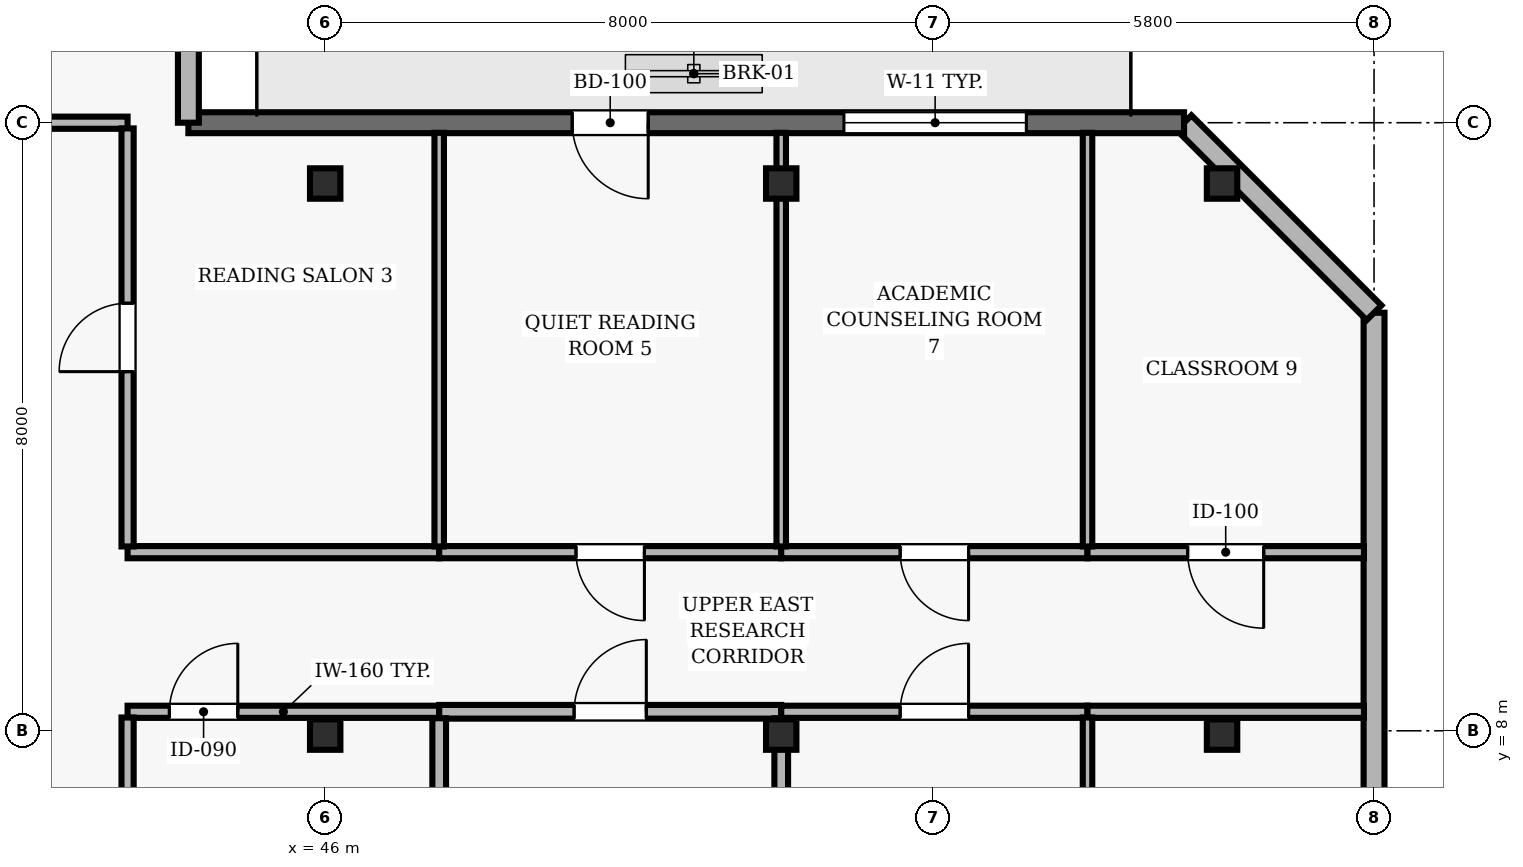
"""IFC4 building model, lengths in metres.
Left out: names, types, materials, properties, quantities, classifications, styles, units other than length and angle.
Written with IfcOpenShell. Run it as: python <this file> out.ifc"""

import sys

from ifc_helpers import new_model, si_unit, direction, frame, frame_2d, origin, origin_2d, place, context, subcontext, project, spatial, rectangle, hollow_rectangle, extrude, element, fill, save


model = new_model("IFC4")
c1 = context("Model", 3, precision=1e-05, world=origin(), true_north=direction((0.0, 1.0)))
c2 = subcontext(c1, "Body", "Model", "MODEL_VIEW")
j1 = project(units=[si_unit("LENGTHUNIT", "METRE"), si_unit("PLANEANGLEUNIT", "RADIAN")], contexts=[c1])
p1 = place(None, origin())
s1 = spatial("IfcSite", under=j1, at=p1, CompositionType="ELEMENT")
p2 = place(p1, origin())
s2 = spatial("IfcBuilding", under=s1, at=p2, CompositionType="ELEMENT")
p3 = place(p2, frame((0.0, 0.0, 271.6)))
s3 = spatial("IfcBuildingStorey", under=s2, at=p3, CompositionType="ELEMENT", Elevation=271.6)
for number, where, z_axis, x_axis in (
    (1, (46.0, 7.95, 0.0), (0.0, 0.0, 1.0), (1.0, 0.0, 0.0)),
    (2, (46.0, 15.2, 0.0), (0.0, 0.0, 1.0), (1.0, 0.0, 0.0)),
    (3, (52.0, 7.95, 0.0), (0.0, 0.0, 1.0), (1.0, 0.0, 0.0)),
    (4, (52.0, 15.2, 0.0), (0.0, 0.0, 1.0), (1.0, 0.0, 0.0)),
    (5, (57.8, 7.95, 0.0), (0.0, 0.0, 1.0), (1.0, 0.0, 0.0)),
    (6, (57.8, 15.2, 0.0), (0.0, 0.0, 1.0), (1.0, 0.0, 0.0)),
):
    element("IfcColumn", number, at=place(p3, frame(where, z_axis=z_axis, x_axis=x_axis)), inside=s3, PredefinedType="COLUMN", context=c2, shape_type="SweptSolid", body=[
        extrude(hollow_rectangle(XDim=0.4, YDim=0.4, WallThickness=0.02, at=origin_2d()), origin(), (0.0, 0.0, 1.0), 3.9),
    ])
p4 = place(p3, frame((59.8, 2.5, 0.0), z_axis=(0.0, 0.0, 1.0), x_axis=(0.0, 1.0, 0.0)))
e7 = element("IfcWall", 7, at=p4, inside=s3, PredefinedType="SOLIDWALL", context=c2, shape_type="SweptSolid", body=[
    extrude(rectangle(XDim=11.0, YDim=0.275, at=frame_2d((5.5, 0.0))), origin(), (0.0, 0.0, 1.0), 3.69),
])
p5 = place(p4, frame((1.35, 0.0, 0.9)))
e8 = element("IfcOpeningElement", 8, at=p5, cuts=e7, PredefinedType="OPENING", context=c2, shape_type="SweptSolid", body=[
    extrude(rectangle(XDim=2.8, YDim=1.8, at=frame_2d((1.4, 0.9))), frame((0.0, 0.147, 0.0), z_axis=(0.0, -1.0, 0.0), x_axis=(1.0, 0.0, 0.0)), (0.0, 0.0, 1.0), 0.295),
])
p6 = place(p3, frame((59.8, 13.5, 0.0), z_axis=(0.0, 0.0, 1.0), x_axis=(-0.707106781187, 0.707106781187, 0.0)))
e9 = element("IfcWall", 9, at=p6, inside=s3, PredefinedType="SOLIDWALL", context=c2, shape_type="SweptSolid", body=[
    extrude(rectangle(XDim=3.536, YDim=0.275, at=frame_2d((1.768, 0.0))), origin(), (0.0, 0.0, 1.0), 3.69),
])
p7 = place(p3, frame((57.3, 16.0, 0.0), z_axis=(0.0, 0.0, 1.0), x_axis=(-1.0, 0.0, 0.0)))
e10 = element("IfcWall", 10, at=p7, inside=s3, PredefinedType="SOLIDWALL", context=c2, shape_type="SweptSolid", body=[
    extrude(rectangle(XDim=13.1, YDim=0.275, at=frame_2d((6.55, 0.0))), origin(), (0.0, 0.0, 1.0), 3.69),
])
p8 = place(p7, frame((7.05, 0.0, 0.0)))
e11 = element("IfcOpeningElement", 11, at=p8, cuts=e10, PredefinedType="OPENING", context=c2, shape_type="SweptSolid", body=[
    extrude(rectangle(XDim=1.0, YDim=2.2, at=frame_2d((0.5, 1.1))), frame((0.0, 0.147, 0.0), z_axis=(0.0, -1.0, 0.0), x_axis=(1.0, 0.0, 0.0)), (0.0, 0.0, 1.0), 0.295),
])
p9 = place(p7, frame((2.075, 0.0, 0.9)))
e12 = element("IfcOpeningElement", 12, at=p9, cuts=e10, PredefinedType="OPENING", context=c2, shape_type="SweptSolid", body=[
    extrude(rectangle(XDim=2.4, YDim=2.2, at=frame_2d((1.2, 1.1))), frame((0.0, 0.147, 0.0), z_axis=(0.0, -1.0, 0.0), x_axis=(1.0, 0.0, 0.0)), (0.0, 0.0, 1.0), 0.295),
])
p10 = place(p3, frame((44.2, 16.0, 0.0), z_axis=(0.0, 0.0, 1.0), x_axis=(0.0, 1.0, 0.0)))
e13 = element("IfcWall", 13, at=p10, inside=s3, PredefinedType="SOLIDWALL", context=c2, shape_type="SweptSolid", body=[
    extrude(rectangle(XDim=5.4, YDim=0.275, at=frame_2d((2.7, 0.0))), origin(), (0.0, 0.0, 1.0), 3.69),
])
p11 = place(p10, frame((1.2, 0.0, 0.9)))
e14 = element("IfcOpeningElement", 14, at=p11, cuts=e13, PredefinedType="OPENING", context=c2, shape_type="SweptSolid", body=[
    extrude(rectangle(XDim=3.0, YDim=2.2, at=frame_2d((1.5, 1.1))), frame((0.0, 0.147, 0.0), z_axis=(0.0, -1.0, 0.0), x_axis=(1.0, 0.0, 0.0)), (0.0, 0.0, 1.0), 0.295),
])
p12 = place(p3, frame((43.4, 8.25, 0.0), z_axis=(0.0, 0.0, 1.0), x_axis=(1.0, 0.0, 0.0)))
e15 = element("IfcWall", 15, at=p12, inside=s3, PredefinedType="PARTITIONING", context=c2, shape_type="SweptSolid", body=[
    extrude(rectangle(XDim=4.1, YDim=0.16, at=frame_2d((2.05, 0.0))), origin(), (0.0, 0.0, 1.0), 3.221),
])
p13 = place(p12, frame((0.55, 0.0, 0.0)))
e16 = element("IfcOpeningElement", 16, at=p13, cuts=e15, PredefinedType="OPENING", context=c2, shape_type="SweptSolid", body=[
    extrude(rectangle(XDim=0.9, YDim=2.1, at=frame_2d((0.45, 1.05))), frame((0.0, 0.09, 0.0), z_axis=(0.0, -1.0, 0.0), x_axis=(1.0, 0.0, 0.0)), (0.0, 0.0, 1.0), 0.18),
])
p14 = place(p3, frame((43.4, 16.0, 0.0), z_axis=(0.0, 0.0, 1.0), x_axis=(-1.0, 0.0, 0.0)))
e17 = element("IfcWall", 17, at=p14, inside=s3, PredefinedType="PARTITIONING", context=c2, shape_type="SweptSolid", body=[
    extrude(rectangle(XDim=5.35, YDim=0.16, at=frame_2d((2.675, 0.0))), origin(), (0.0, 0.0, 1.0), 3.39),
])
p15 = place(p14, frame((2.225, 0.0, 0.0)))
e18 = element("IfcOpeningElement", 18, at=p15, cuts=e17, PredefinedType="OPENING", context=c2, shape_type="SweptSolid", body=[
    extrude(rectangle(XDim=0.9, YDim=2.1, at=frame_2d((0.45, 1.05))), frame((0.0, 0.09, 0.0), z_axis=(0.0, -1.0, 0.0), x_axis=(1.0, 0.0, 0.0)), (0.0, 0.0, 1.0), 0.18),
])
p16 = place(p3, frame((47.5, 8.25, 0.0), z_axis=(0.0, 0.0, 1.0), x_axis=(1.0, 0.0, 0.0)))
e19 = element("IfcWall", 19, at=p16, inside=s3, PredefinedType="PARTITIONING", context=c2, shape_type="SweptSolid", body=[
    extrude(rectangle(XDim=4.5, YDim=0.18, at=frame_2d((2.25, 0.0))), origin(), (0.0, 0.0, 1.0), 3.221),
])
p17 = place(p16, frame((1.775, 0.0, 0.0)))
e20 = element("IfcOpeningElement", 20, at=p17, cuts=e19, PredefinedType="OPENING", context=c2, shape_type="SweptSolid", body=[
    extrude(rectangle(XDim=0.95, YDim=2.1, at=frame_2d((0.475, 1.05))), frame((0.0, 0.1, 0.0), z_axis=(0.0, -1.0, 0.0), x_axis=(1.0, 0.0, 0.0)), (0.0, 0.0, 1.0), 0.2),
])
p18 = place(p3, frame((47.5, 10.35, 0.0), z_axis=(0.0, 0.0, 1.0), x_axis=(-1.0, 0.0, 0.0)))
e21 = element("IfcWall", 21, at=p18, inside=s3, PredefinedType="PARTITIONING", context=c2, shape_type="SweptSolid", body=[
    extrude(rectangle(XDim=4.1, YDim=0.16, at=frame_2d((2.05, 0.0))), origin(), (0.0, 0.0, 1.0), 3.372),
])
p19 = place(p3, frame((52.0, 8.25, 0.0), z_axis=(0.0, 0.0, 1.0), x_axis=(1.0, 0.0, 0.0)))
e22 = element("IfcWall", 22, at=p19, inside=s3, PredefinedType="PARTITIONING", context=c2, shape_type="SweptSolid", body=[
    extrude(rectangle(XDim=4.03, YDim=0.16, at=frame_2d((2.015, 0.0))), origin(), (0.0, 0.0, 1.0), 3.221),
])
p20 = place(p19, frame((1.565, 0.0, 0.0)))
e23 = element("IfcOpeningElement", 23, at=p20, cuts=e22, PredefinedType="OPENING", context=c2, shape_type="SweptSolid", body=[
    extrude(rectangle(XDim=0.9, YDim=2.1, at=frame_2d((0.45, 1.05))), frame((0.0, 0.09, 0.0), z_axis=(0.0, -1.0, 0.0), x_axis=(1.0, 0.0, 0.0)), (0.0, 0.0, 1.0), 0.18),
])
p21 = place(p3, frame((52.0, 10.35, 0.0), z_axis=(0.0, 0.0, 1.0), x_axis=(-1.0, 0.0, 0.0)))
e24 = element("IfcWall", 24, at=p21, inside=s3, PredefinedType="PARTITIONING", context=c2, shape_type="SweptSolid", body=[
    extrude(rectangle(XDim=4.5, YDim=0.16, at=frame_2d((2.25, 0.0))), origin(), (0.0, 0.0, 1.0), 3.372),
])
p22 = place(p21, frame((1.8, 0.0, 0.0)))
e25 = element("IfcOpeningElement", 25, at=p22, cuts=e24, PredefinedType="OPENING", context=c2, shape_type="SweptSolid", body=[
    extrude(rectangle(XDim=0.9, YDim=2.1, at=frame_2d((0.45, 1.05))), frame((0.0, 0.09, 0.0), z_axis=(0.0, -1.0, 0.0), x_axis=(1.0, 0.0, 0.0)), (0.0, 0.0, 1.0), 0.18),
])
p23 = place(p3, frame((56.03, 8.25, 0.0), z_axis=(0.0, 0.0, 1.0), x_axis=(1.0, 0.0, 0.0)))
e26 = element("IfcWall", 26, at=p23, inside=s3, PredefinedType="PARTITIONING", context=c2, shape_type="SweptSolid", body=[
    extrude(rectangle(XDim=3.637, YDim=0.16, at=frame_2d((1.818, 0.0))), origin(), (0.0, 0.0, 1.0), 3.221),
])
p24 = place(p3, frame((56.03, 10.35, 0.0), z_axis=(0.0, 0.0, 1.0), x_axis=(-1.0, 0.0, 0.0)))
e27 = element("IfcWall", 27, at=p24, inside=s3, PredefinedType="PARTITIONING", context=c2, shape_type="SweptSolid", body=[
    extrude(rectangle(XDim=4.03, YDim=0.16, at=frame_2d((2.015, 0.0))), origin(), (0.0, 0.0, 1.0), 3.372),
])
p25 = place(p24, frame((1.565, 0.0, 0.0)))
e28 = element("IfcOpeningElement", 28, at=p25, cuts=e27, PredefinedType="OPENING", context=c2, shape_type="SweptSolid", body=[
    extrude(rectangle(XDim=0.9, YDim=2.1, at=frame_2d((0.45, 1.05))), frame((0.0, 0.09, 0.0), z_axis=(0.0, -1.0, 0.0), x_axis=(1.0, 0.0, 0.0)), (0.0, 0.0, 1.0), 0.18),
])
p26 = place(p3, frame((59.667, 10.35, 0.0), z_axis=(0.0, 0.0, 1.0), x_axis=(-1.0, 0.0, 0.0)))
e29 = element("IfcWall", 29, at=p26, inside=s3, PredefinedType="PARTITIONING", context=c2, shape_type="SweptSolid", body=[
    extrude(rectangle(XDim=3.637, YDim=0.16, at=frame_2d((1.818, 0.0))), origin(), (0.0, 0.0, 1.0), 3.372),
])
p27 = place(p26, frame((1.319, 0.0, 0.0)))
e30 = element("IfcOpeningElement", 30, at=p27, cuts=e29, PredefinedType="OPENING", context=c2, shape_type="SweptSolid", body=[
    extrude(rectangle(XDim=1.0, YDim=2.1, at=frame_2d((0.5, 1.05))), frame((0.0, 0.09, 0.0), z_axis=(0.0, -1.0, 0.0), x_axis=(1.0, 0.0, 0.0)), (0.0, 0.0, 1.0), 0.18),
])
p28 = place(p3, frame((43.4, 7.135, 0.0), z_axis=(0.0, 0.0, 1.0), x_axis=(0.0, 1.0, 0.0)))
e31 = element("IfcWall", 31, at=p28, inside=s3, PredefinedType="PARTITIONING", context=c2, shape_type="SweptSolid", body=[
    extrude(rectangle(XDim=1.04, YDim=0.16, at=frame_2d((0.52, 0.0))), origin(), (0.0, 0.0, 1.0), 3.69),
])
p29 = place(p3, frame((43.4, 10.425, 0.0), z_axis=(0.0, 0.0, 1.0), x_axis=(0.0, 1.0, 0.0)))
e32 = element("IfcWall", 32, at=p29, inside=s3, PredefinedType="PARTITIONING", context=c2, shape_type="SweptSolid", body=[
    extrude(rectangle(XDim=5.5, YDim=0.16, at=frame_2d((2.75, 0.0))), origin(), (0.0, 0.0, 1.0), 3.69),
])
p30 = place(p29, frame((2.3, 0.0, 0.0)))
e33 = element("IfcOpeningElement", 33, at=p30, cuts=e32, PredefinedType="OPENING", context=c2, shape_type="SweptSolid", body=[
    extrude(rectangle(XDim=0.9, YDim=2.1, at=frame_2d((0.45, 1.05))), frame((0.0, 0.09, 0.0), z_axis=(0.0, -1.0, 0.0), x_axis=(1.0, 0.0, 0.0)), (0.0, 0.0, 1.0), 0.18),
])
p31 = place(p3, frame((47.5, 0.133, 0.0), z_axis=(0.0, 0.0, 1.0), x_axis=(0.0, 1.0, 0.0)))
e34 = element("IfcWall", 34, at=p31, inside=s3, PredefinedType="PARTITIONING", context=c2, shape_type="SweptSolid", body=[
    extrude(rectangle(XDim=8.032, YDim=0.18, at=frame_2d((4.016, 0.0))), origin(), (0.0, 0.0, 1.0), 3.69),
])
p32 = place(p3, frame((47.5, 10.425, 0.0), z_axis=(0.0, 0.0, 1.0), x_axis=(0.0, 1.0, 0.0)))
e35 = element("IfcWall", 35, at=p32, inside=s3, PredefinedType="PARTITIONING", context=c2, shape_type="SweptSolid", body=[
    extrude(rectangle(XDim=5.442, YDim=0.125, at=frame_2d((2.721, 0.0))), origin(), (0.0, 0.0, 1.0), 3.69),
])
p33 = place(p3, frame((52.0, 0.133, 0.0), z_axis=(0.0, 0.0, 1.0), x_axis=(0.0, 1.0, 0.0)))
e36 = element("IfcWall", 36, at=p33, inside=s3, PredefinedType="PARTITIONING", context=c2, shape_type="SweptSolid", body=[
    extrude(rectangle(XDim=8.032, YDim=0.18, at=frame_2d((4.016, 0.0))), origin(), (0.0, 0.0, 1.0), 3.221),
])
p34 = place(p3, frame((52.0, 10.425, 0.0), z_axis=(0.0, 0.0, 1.0), x_axis=(0.0, 1.0, 0.0)))
e37 = element("IfcWall", 37, at=p34, inside=s3, PredefinedType="PARTITIONING", context=c2, shape_type="SweptSolid", body=[
    extrude(rectangle(XDim=5.442, YDim=0.125, at=frame_2d((2.721, 0.0))), origin(), (0.0, 0.0, 1.0), 3.221),
])
p35 = place(p3, frame((56.03, 0.133, 0.0), z_axis=(0.0, 0.0, 1.0), x_axis=(0.0, 1.0, 0.0)))
e38 = element("IfcWall", 38, at=p35, inside=s3, PredefinedType="PARTITIONING", context=c2, shape_type="SweptSolid", body=[
    extrude(rectangle(XDim=8.042, YDim=0.125, at=frame_2d((4.021, 0.0))), origin(), (0.0, 0.0, 1.0), 3.69),
])
p36 = place(p35, frame((3.571, 0.0, 0.0)))
e39 = element("IfcOpeningElement", 39, at=p36, cuts=e38, PredefinedType="OPENING", context=c2, shape_type="SweptSolid", body=[
    extrude(rectangle(XDim=0.9, YDim=2.1, at=frame_2d((0.45, 1.05))), frame((0.0, 0.073, 0.0), z_axis=(0.0, -1.0, 0.0), x_axis=(1.0, 0.0, 0.0)), (0.0, 0.0, 1.0), 0.145),
])
p37 = place(p3, frame((56.03, 10.425, 0.0), z_axis=(0.0, 0.0, 1.0), x_axis=(0.0, 1.0, 0.0)))
e40 = element("IfcWall", 40, at=p37, inside=s3, PredefinedType="PARTITIONING", context=c2, shape_type="SweptSolid", body=[
    extrude(rectangle(XDim=5.442, YDim=0.125, at=frame_2d((2.721, 0.0))), origin(), (0.0, 0.0, 1.0), 3.69),
])
p38 = place(p8, origin())
e41 = element("IfcDoor", 41, at=p38, inside=s3, OperationType="SINGLE_SWING_LEFT", PredefinedType="DOOR", context=c2, shape_type="SweptSolid", body=[
    extrude(rectangle(XDim=1.0, YDim=2.2, at=frame_2d((0.5, 1.1))), frame((0.0, 0.025, 0.0), z_axis=(0.0, -1.0, 0.0), x_axis=(1.0, 0.0, 0.0)), (0.0, 0.0, 1.0), 0.05),
])
fill(e11, e41)
p39 = place(p9, origin())
e42 = element("IfcWindow", 42, at=p39, inside=s3, PartitioningType="SINGLE_PANEL", PredefinedType="WINDOW", context=c2, shape_type="SweptSolid", body=[
    extrude(rectangle(XDim=2.4, YDim=2.2, at=frame_2d((1.2, 1.1))), frame((0.0, 0.03, 0.0), z_axis=(0.0, -1.0, 0.0), x_axis=(1.0, 0.0, 0.0)), (0.0, 0.0, 1.0), 0.06),
])
fill(e12, e42)
p40 = place(p13, origin())
e43 = element("IfcDoor", 43, at=p40, inside=s3, OperationType="SINGLE_SWING_RIGHT", PredefinedType="DOOR", context=c2, shape_type="SweptSolid", body=[
    extrude(rectangle(XDim=0.9, YDim=2.1, at=frame_2d((0.45, 1.05))), frame((0.0, 0.025, 0.0), z_axis=(0.0, -1.0, 0.0), x_axis=(1.0, 0.0, 0.0)), (0.0, 0.0, 1.0), 0.05),
])
fill(e16, e43)
p41 = place(p30, origin())
e44 = element("IfcDoor", 44, at=p41, inside=s3, OperationType="SINGLE_SWING_LEFT", PredefinedType="DOOR", context=c2, shape_type="SweptSolid", body=[
    extrude(rectangle(XDim=0.9, YDim=2.1, at=frame_2d((0.45, 1.05))), frame((0.0, 0.025, 0.0), z_axis=(0.0, -1.0, 0.0), x_axis=(1.0, 0.0, 0.0)), (0.0, 0.0, 1.0), 0.05),
])
fill(e33, e44)
p42 = place(p17, origin())
e45 = element("IfcDoor", 45, at=p42, inside=s3, OperationType="SINGLE_SWING_RIGHT", PredefinedType="DOOR", context=c2, shape_type="SweptSolid", body=[
    extrude(rectangle(XDim=0.95, YDim=2.1, at=frame_2d((0.475, 1.05))), frame((0.0, 0.025, 0.0), z_axis=(0.0, -1.0, 0.0), x_axis=(1.0, 0.0, 0.0)), (0.0, 0.0, 1.0), 0.05),
])
fill(e20, e45)
p43 = place(p22, origin())
e46 = element("IfcDoor", 46, at=p43, inside=s3, OperationType="SINGLE_SWING_LEFT", PredefinedType="DOOR", context=c2, shape_type="SweptSolid", body=[
    extrude(rectangle(XDim=0.9, YDim=2.1, at=frame_2d((0.45, 1.05))), frame((0.0, 0.025, 0.0), z_axis=(0.0, -1.0, 0.0), x_axis=(1.0, 0.0, 0.0)), (0.0, 0.0, 1.0), 0.05),
])
fill(e25, e46)
p44 = place(p20, origin())
e47 = element("IfcDoor", 47, at=p44, inside=s3, OperationType="SINGLE_SWING_RIGHT", PredefinedType="DOOR", context=c2, shape_type="SweptSolid", body=[
    extrude(rectangle(XDim=0.9, YDim=2.1, at=frame_2d((0.45, 1.05))), frame((0.0, 0.025, 0.0), z_axis=(0.0, -1.0, 0.0), x_axis=(1.0, 0.0, 0.0)), (0.0, 0.0, 1.0), 0.05),
])
fill(e23, e47)
p45 = place(p25, origin())
e48 = element("IfcDoor", 48, at=p45, inside=s3, OperationType="SINGLE_SWING_LEFT", PredefinedType="DOOR", context=c2, shape_type="SweptSolid", body=[
    extrude(rectangle(XDim=0.9, YDim=2.1, at=frame_2d((0.45, 1.05))), frame((0.0, 0.025, 0.0), z_axis=(0.0, -1.0, 0.0), x_axis=(1.0, 0.0, 0.0)), (0.0, 0.0, 1.0), 0.05),
])
fill(e28, e48)
p46 = place(p27, origin())
e49 = element("IfcDoor", 49, at=p46, inside=s3, OperationType="SINGLE_SWING_LEFT", PredefinedType="DOOR", context=c2, shape_type="SweptSolid", body=[
    extrude(rectangle(XDim=1.0, YDim=2.1, at=frame_2d((0.5, 1.05))), frame((0.0, 0.025, 0.0), z_axis=(0.0, -1.0, 0.0), x_axis=(1.0, 0.0, 0.0)), (0.0, 0.0, 1.0), 0.05),
])
fill(e30, e49)
save(model, sys.argv[1])
